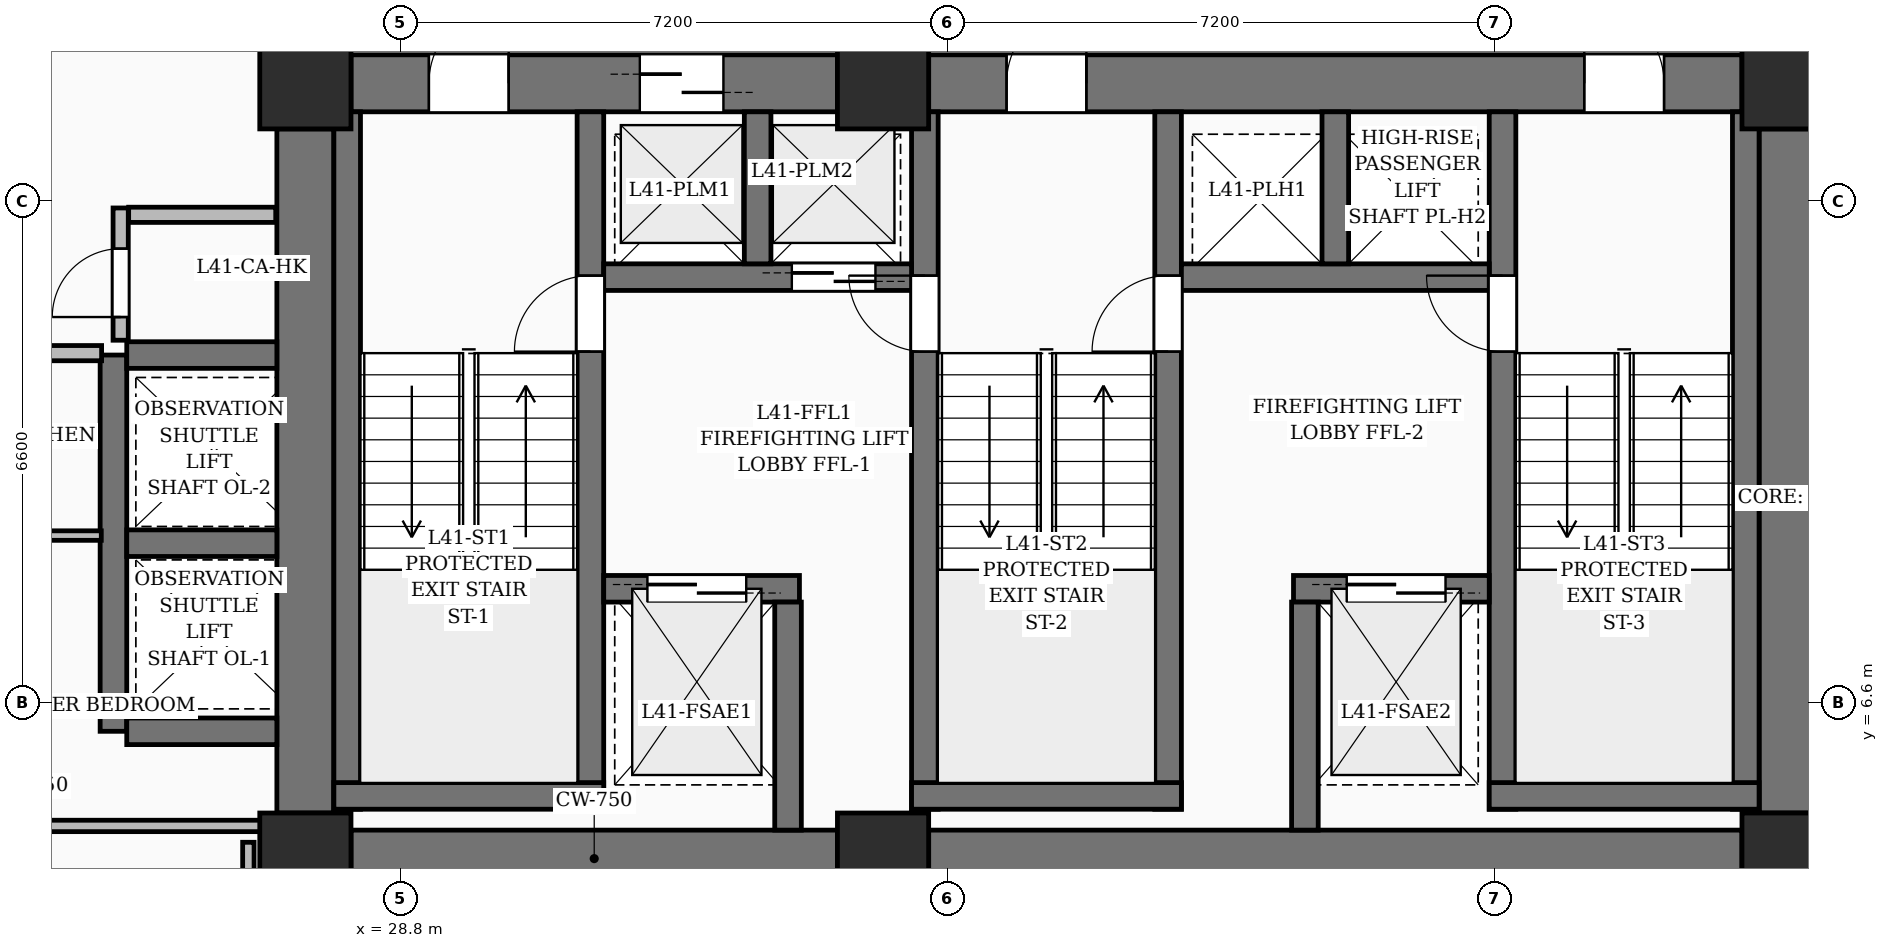
"""IFC4 building model, lengths in metres.
Left out: names, types, materials, properties, quantities, classifications, styles, units other than length and angle.
Written with IfcOpenShell. Run it as: python <this file> out.ifc"""

import sys

from ifc_helpers import new_model, si_unit, direction, frame, frame_2d, origin, origin_2d, place, context, subcontext, project, spatial, rectangle, extrude, element, fill, save


model = new_model("IFC4")
c1 = context("Model", 3, precision=1e-05, world=origin(), true_north=direction((0.0, 1.0)))
c2 = subcontext(c1, "Body", "Model", "MODEL_VIEW")
j1 = project(units=[si_unit("LENGTHUNIT", "METRE"), si_unit("PLANEANGLEUNIT", "RADIAN")], contexts=[c1])
p1 = place(None, origin())
s1 = spatial("IfcSite", under=j1, at=p1, CompositionType="ELEMENT")
p2 = place(p1, origin())
s2 = spatial("IfcBuilding", under=s1, at=p2, CompositionType="ELEMENT")
p3 = place(p2, frame((0.0, 0.0, 160.8)))
s3 = spatial("IfcBuildingStorey", under=s2, at=p3, CompositionType="ELEMENT", Elevation=160.8)
for number, where, z_axis, x_axis in (
    (1, (27.55, 4.55, 0.0), (0.0, 0.0, 1.0), (1.0, 0.0, 0.0)),
    (2, (35.15, 4.55, 0.0), (0.0, 0.0, 1.0), (1.0, 0.0, 0.0)),
    (3, (47.05, 4.55, 0.0), (0.0, 0.0, 1.0), (1.0, 0.0, 0.0)),
    (4, (27.55, 14.75, 0.0), (0.0, 0.0, 1.0), (1.0, 0.0, 0.0)),
    (5, (35.15, 14.75, 0.0), (0.0, 0.0, 1.0), (1.0, 0.0, 0.0)),
    (6, (47.05, 14.75, 0.0), (0.0, 0.0, 1.0), (1.0, 0.0, 0.0)),
):
    element("IfcColumn", number, at=place(p3, frame(where, z_axis=z_axis, x_axis=x_axis)), inside=s3, PredefinedType="COLUMN", context=c2, shape_type="SweptSolid", body=[
        extrude(rectangle(XDim=1.2, YDim=1.2, at=origin_2d()), origin(), (0.0, 0.0, 1.0), 3.6),
    ])
p4 = place(p3, frame((28.15, 4.55, 0.0), z_axis=(0.0, 0.0, 1.0), x_axis=(1.0, 0.0, 0.0)))
e7 = element("IfcWall", 7, at=p4, inside=s3, PredefinedType="SHEAR", context=c2, shape_type="SweptSolid", body=[
    extrude(rectangle(XDim=6.4, YDim=0.75, at=frame_2d((3.2, 0.0))), origin(), (0.0, 0.0, 1.0), 3.6),
])
p5 = place(p3, frame((35.75, 4.55, 0.0), z_axis=(0.0, 0.0, 1.0), x_axis=(1.0, 0.0, 0.0)))
e8 = element("IfcWall", 8, at=p5, inside=s3, PredefinedType="SHEAR", context=c2, shape_type="SweptSolid", body=[
    extrude(rectangle(XDim=10.7, YDim=0.75, at=frame_2d((5.35, 0.0))), origin(), (0.0, 0.0, 1.0), 3.6),
])
p6 = place(p3, frame((28.15, 14.75, 0.0), z_axis=(0.0, 0.0, 1.0), x_axis=(1.0, 0.0, 0.0)))
e9 = element("IfcWall", 9, at=p6, inside=s3, PredefinedType="SHEAR", context=c2, shape_type="SweptSolid", body=[
    extrude(rectangle(XDim=6.4, YDim=0.75, at=frame_2d((3.2, 0.0))), origin(), (0.0, 0.0, 1.0), 3.6),
])
p7 = place(p6, frame((1.025, 0.0, 0.0)))
e10 = element("IfcOpeningElement", 10, at=p7, cuts=e9, PredefinedType="OPENING", context=c2, shape_type="SweptSolid", body=[
    extrude(rectangle(XDim=1.05, YDim=2.15, at=frame_2d((0.525, 1.075))), frame((0.0, 0.385, 0.0), z_axis=(0.0, -1.0, 0.0), x_axis=(1.0, 0.0, 0.0)), (0.0, 0.0, 1.0), 0.77),
])
p8 = place(p6, frame((3.8, 0.0, 0.0)))
e11 = element("IfcOpeningElement", 11, at=p8, cuts=e9, PredefinedType="OPENING", context=c2, shape_type="SweptSolid", body=[
    extrude(rectangle(XDim=1.1, YDim=2.2, at=frame_2d((0.55, 1.1))), frame((0.0, 0.385, 0.0), z_axis=(0.0, -1.0, 0.0), x_axis=(1.0, 0.0, 0.0)), (0.0, 0.0, 1.0), 0.77),
])
p9 = place(p3, frame((35.75, 14.75, 0.0), z_axis=(0.0, 0.0, 1.0), x_axis=(1.0, 0.0, 0.0)))
e12 = element("IfcWall", 12, at=p9, inside=s3, PredefinedType="SHEAR", context=c2, shape_type="SweptSolid", body=[
    extrude(rectangle(XDim=10.7, YDim=0.75, at=frame_2d((5.35, 0.0))), origin(), (0.0, 0.0, 1.0), 3.6),
])
p10 = place(p9, frame((1.025, 0.0, 0.0)))
e13 = element("IfcOpeningElement", 13, at=p10, cuts=e12, PredefinedType="OPENING", context=c2, shape_type="SweptSolid", body=[
    extrude(rectangle(XDim=1.05, YDim=2.15, at=frame_2d((0.525, 1.075))), frame((0.0, 0.385, 0.0), z_axis=(0.0, -1.0, 0.0), x_axis=(1.0, 0.0, 0.0)), (0.0, 0.0, 1.0), 0.77),
])
p11 = place(p9, frame((8.625, 0.0, 0.0)))
e14 = element("IfcOpeningElement", 14, at=p11, cuts=e12, PredefinedType="OPENING", context=c2, shape_type="SweptSolid", body=[
    extrude(rectangle(XDim=1.05, YDim=2.15, at=frame_2d((0.525, 1.075))), frame((0.0, 0.385, 0.0), z_axis=(0.0, -1.0, 0.0), x_axis=(1.0, 0.0, 0.0)), (0.0, 0.0, 1.0), 0.77),
])
for number, where, z_axis, x_axis in (
    (15, (27.55, 5.15, 0.0), (0.0, 0.0, 1.0), (0.0, 1.0, 0.0)),
    (16, (47.05, 5.15, 0.0), (0.0, 0.0, 1.0), (0.0, 1.0, 0.0)),
):
    element("IfcWall", number, at=place(p3, frame(where, z_axis=z_axis, x_axis=x_axis)), inside=s3, PredefinedType="SHEAR", context=c2, shape_type="SweptSolid", body=[
        extrude(rectangle(XDim=9.0, YDim=0.75, at=frame_2d((4.5, 0.0))), origin(), (0.0, 0.0, 1.0), 3.6),
    ])
p12 = place(p3, frame((28.1, 5.2, 0.0), z_axis=(0.0, 0.0, 1.0), x_axis=(0.0, 1.0, 0.0)))
e17 = element("IfcWall", 17, at=p12, inside=s3, PredefinedType="SOLIDWALL", context=c2, shape_type="SweptSolid", body=[
    extrude(rectangle(XDim=9.175, YDim=0.35, at=frame_2d((4.587, 0.0))), origin(), (0.0, 0.0, 1.0), 3.6),
])
p13 = place(p3, frame((31.3, 5.2, 0.0), z_axis=(0.0, 0.0, 1.0), x_axis=(0.0, 1.0, 0.0)))
e18 = element("IfcWall", 18, at=p13, inside=s3, PredefinedType="SOLIDWALL", context=c2, shape_type="SweptSolid", body=[
    extrude(rectangle(XDim=9.175, YDim=0.35, at=frame_2d((4.587, 0.0))), origin(), (0.0, 0.0, 1.0), 3.6),
])
p14 = place(p13, frame((6.02, 0.0, 0.0)))
e19 = element("IfcOpeningElement", 19, at=p14, cuts=e18, PredefinedType="OPENING", context=c2, shape_type="SweptSolid", body=[
    extrude(rectangle(XDim=1.0, YDim=2.15, at=frame_2d((0.5, 1.075))), frame((0.0, 0.185, 0.0), z_axis=(0.0, -1.0, 0.0), x_axis=(1.0, 0.0, 0.0)), (0.0, 0.0, 1.0), 0.37),
])
p15 = place(p3, frame((27.925, 5.375, 0.0), z_axis=(0.0, 0.0, 1.0), x_axis=(1.0, 0.0, 0.0)))
e20 = element("IfcWall", 20, at=p15, inside=s3, PredefinedType="SOLIDWALL", context=c2, shape_type="SweptSolid", body=[
    extrude(rectangle(XDim=3.55, YDim=0.35, at=frame_2d((1.775, 0.0))), origin(), (0.0, 0.0, 1.0), 3.6),
])
p16 = place(p3, frame((35.7, 5.2, 0.0), z_axis=(0.0, 0.0, 1.0), x_axis=(0.0, 1.0, 0.0)))
e21 = element("IfcWall", 21, at=p16, inside=s3, PredefinedType="SOLIDWALL", context=c2, shape_type="SweptSolid", body=[
    extrude(rectangle(XDim=9.175, YDim=0.35, at=frame_2d((4.587, 0.0))), origin(), (0.0, 0.0, 1.0), 3.6),
])
p17 = place(p16, frame((6.02, 0.0, 0.0)))
e22 = element("IfcOpeningElement", 22, at=p17, cuts=e21, PredefinedType="OPENING", context=c2, shape_type="SweptSolid", body=[
    extrude(rectangle(XDim=1.0, YDim=2.15, at=frame_2d((0.5, 1.075))), frame((0.0, 0.185, 0.0), z_axis=(0.0, -1.0, 0.0), x_axis=(1.0, 0.0, 0.0)), (0.0, 0.0, 1.0), 0.37),
])
p18 = place(p3, frame((38.9, 5.2, 0.0), z_axis=(0.0, 0.0, 1.0), x_axis=(0.0, 1.0, 0.0)))
e23 = element("IfcWall", 23, at=p18, inside=s3, PredefinedType="SOLIDWALL", context=c2, shape_type="SweptSolid", body=[
    extrude(rectangle(XDim=9.175, YDim=0.35, at=frame_2d((4.587, 0.0))), origin(), (0.0, 0.0, 1.0), 3.6),
])
p19 = place(p18, frame((6.02, 0.0, 0.0)))
e24 = element("IfcOpeningElement", 24, at=p19, cuts=e23, PredefinedType="OPENING", context=c2, shape_type="SweptSolid", body=[
    extrude(rectangle(XDim=1.0, YDim=2.15, at=frame_2d((0.5, 1.075))), frame((0.0, 0.185, 0.0), z_axis=(0.0, -1.0, 0.0), x_axis=(1.0, 0.0, 0.0)), (0.0, 0.0, 1.0), 0.37),
])
p20 = place(p3, frame((35.525, 5.375, 0.0), z_axis=(0.0, 0.0, 1.0), x_axis=(1.0, 0.0, 0.0)))
e25 = element("IfcWall", 25, at=p20, inside=s3, PredefinedType="SOLIDWALL", context=c2, shape_type="SweptSolid", body=[
    extrude(rectangle(XDim=3.55, YDim=0.35, at=frame_2d((1.775, 0.0))), origin(), (0.0, 0.0, 1.0), 3.6),
])
p21 = place(p3, frame((43.3, 5.2, 0.0), z_axis=(0.0, 0.0, 1.0), x_axis=(0.0, 1.0, 0.0)))
e26 = element("IfcWall", 26, at=p21, inside=s3, PredefinedType="SOLIDWALL", context=c2, shape_type="SweptSolid", body=[
    extrude(rectangle(XDim=9.175, YDim=0.35, at=frame_2d((4.587, 0.0))), origin(), (0.0, 0.0, 1.0), 3.6),
])
p22 = place(p21, frame((6.02, 0.0, 0.0)))
e27 = element("IfcOpeningElement", 27, at=p22, cuts=e26, PredefinedType="OPENING", context=c2, shape_type="SweptSolid", body=[
    extrude(rectangle(XDim=1.0, YDim=2.15, at=frame_2d((0.5, 1.075))), frame((0.0, 0.185, 0.0), z_axis=(0.0, -1.0, 0.0), x_axis=(1.0, 0.0, 0.0)), (0.0, 0.0, 1.0), 0.37),
])
p23 = place(p3, frame((46.5, 5.2, 0.0), z_axis=(0.0, 0.0, 1.0), x_axis=(0.0, 1.0, 0.0)))
e28 = element("IfcWall", 28, at=p23, inside=s3, PredefinedType="SOLIDWALL", context=c2, shape_type="SweptSolid", body=[
    extrude(rectangle(XDim=9.175, YDim=0.35, at=frame_2d((4.587, 0.0))), origin(), (0.0, 0.0, 1.0), 3.6),
])
p24 = place(p3, frame((43.125, 5.375, 0.0), z_axis=(0.0, 0.0, 1.0), x_axis=(1.0, 0.0, 0.0)))
e29 = element("IfcWall", 29, at=p24, inside=s3, PredefinedType="SOLIDWALL", context=c2, shape_type="SweptSolid", body=[
    extrude(rectangle(XDim=3.55, YDim=0.35, at=frame_2d((1.775, 0.0))), origin(), (0.0, 0.0, 1.0), 3.6),
])
p25 = place(p3, frame((31.475, 8.1, 0.0), z_axis=(0.0, 0.0, 1.0), x_axis=(1.0, 0.0, 0.0)))
e30 = element("IfcWall", 30, at=p25, inside=s3, PredefinedType="SOLIDWALL", context=c2, shape_type="SweptSolid", body=[
    extrude(rectangle(XDim=2.575, YDim=0.35, at=frame_2d((1.288, 0.0))), origin(), (0.0, 0.0, 1.0), 3.6),
])
p26 = place(p25, frame((0.575, 0.0, 0.0)))
e31 = element("IfcOpeningElement", 31, at=p26, cuts=e30, PredefinedType="OPENING", context=c2, shape_type="SweptSolid", body=[
    extrude(rectangle(XDim=1.3, YDim=2.25, at=frame_2d((0.65, 1.125))), frame((0.0, 0.185, 0.0), z_axis=(0.0, -1.0, 0.0), x_axis=(1.0, 0.0, 0.0)), (0.0, 0.0, 1.0), 0.37),
])
p27 = place(p3, frame((40.55, 8.1, 0.0), z_axis=(0.0, 0.0, 1.0), x_axis=(1.0, 0.0, 0.0)))
e32 = element("IfcWall", 32, at=p27, inside=s3, PredefinedType="SOLIDWALL", context=c2, shape_type="SweptSolid", body=[
    extrude(rectangle(XDim=2.575, YDim=0.35, at=frame_2d((1.288, 0.0))), origin(), (0.0, 0.0, 1.0), 3.6),
])
p28 = place(p27, frame((0.7, 0.0, 0.0)))
e33 = element("IfcOpeningElement", 33, at=p28, cuts=e32, PredefinedType="OPENING", context=c2, shape_type="SweptSolid", body=[
    extrude(rectangle(XDim=1.3, YDim=2.25, at=frame_2d((0.65, 1.125))), frame((0.0, 0.185, 0.0), z_axis=(0.0, -1.0, 0.0), x_axis=(1.0, 0.0, 0.0)), (0.0, 0.0, 1.0), 0.37),
])
for number, where, z_axis, x_axis in (
    (34, (33.9, 4.925, 0.0), (0.0, 0.0, 1.0), (0.0, 1.0, 0.0)),
    (35, (40.7, 4.925, 0.0), (0.0, 0.0, 1.0), (0.0, 1.0, 0.0)),
):
    element("IfcWall", number, at=place(p3, frame(where, z_axis=z_axis, x_axis=x_axis)), inside=s3, PredefinedType="SOLIDWALL", context=c2, shape_type="SweptSolid", body=[
        extrude(rectangle(XDim=3.0, YDim=0.35, at=frame_2d((1.5, 0.0))), origin(), (0.0, 0.0, 1.0), 3.6),
    ])
p29 = place(p3, frame((31.475, 12.2, 0.0), z_axis=(0.0, 0.0, 1.0), x_axis=(1.0, 0.0, 0.0)))
e36 = element("IfcWall", 36, at=p29, inside=s3, PredefinedType="SOLIDWALL", context=c2, shape_type="SweptSolid", body=[
    extrude(rectangle(XDim=4.05, YDim=0.35, at=frame_2d((2.025, 0.0))), origin(), (0.0, 0.0, 1.0), 3.6),
])
p30 = place(p29, frame((2.475, 0.0, 0.0)))
e37 = element("IfcOpeningElement", 37, at=p30, cuts=e36, PredefinedType="OPENING", context=c2, shape_type="SweptSolid", body=[
    extrude(rectangle(XDim=1.1, YDim=2.2, at=frame_2d((0.55, 1.1))), frame((0.0, 0.185, 0.0), z_axis=(0.0, -1.0, 0.0), x_axis=(1.0, 0.0, 0.0)), (0.0, 0.0, 1.0), 0.37),
])
p31 = place(p3, frame((33.5, 12.375, 0.0), z_axis=(0.0, 0.0, 1.0), x_axis=(0.0, 1.0, 0.0)))
e38 = element("IfcWall", 38, at=p31, inside=s3, PredefinedType="SOLIDWALL", context=c2, shape_type="SweptSolid", body=[
    extrude(rectangle(XDim=2.0, YDim=0.35, at=frame_2d((1.0, 0.0))), origin(), (0.0, 0.0, 1.0), 3.6),
])
p32 = place(p3, frame((39.075, 12.2, 0.0), z_axis=(0.0, 0.0, 1.0), x_axis=(1.0, 0.0, 0.0)))
e39 = element("IfcWall", 39, at=p32, inside=s3, PredefinedType="SOLIDWALL", context=c2, shape_type="SweptSolid", body=[
    extrude(rectangle(XDim=4.05, YDim=0.35, at=frame_2d((2.025, 0.0))), origin(), (0.0, 0.0, 1.0), 3.6),
])
p33 = place(p3, frame((41.1, 12.375, 0.0), z_axis=(0.0, 0.0, 1.0), x_axis=(0.0, 1.0, 0.0)))
e40 = element("IfcWall", 40, at=p33, inside=s3, PredefinedType="SOLIDWALL", context=c2, shape_type="SweptSolid", body=[
    extrude(rectangle(XDim=2.0, YDim=0.35, at=frame_2d((1.0, 0.0))), origin(), (0.0, 0.0, 1.0), 3.6),
])
p34 = place(p3, frame((25.025, 6.225, 0.0), z_axis=(0.0, 0.0, 1.0), x_axis=(0.0, 1.0, 0.0)))
e41 = element("IfcWall", 41, at=p34, inside=s3, PredefinedType="SOLIDWALL", context=c2, shape_type="SweptSolid", body=[
    extrude(rectangle(XDim=4.95, YDim=0.35, at=frame_2d((2.475, 0.0))), origin(), (0.0, 0.0, 1.0), 3.6),
])
for number, where, z_axis, x_axis in (
    (42, (25.2, 6.225, 0.0), (0.0, 0.0, 1.0), (1.0, 0.0, 0.0)),
    (43, (25.2, 8.7, 0.0), (0.0, 0.0, 1.0), (1.0, 0.0, 0.0)),
    (44, (25.2, 11.175, 0.0), (0.0, 0.0, 1.0), (1.0, 0.0, 0.0)),
):
    element("IfcWall", number, at=place(p3, frame(where, z_axis=z_axis, x_axis=x_axis)), inside=s3, PredefinedType="SOLIDWALL", context=c2, shape_type="SweptSolid", body=[
        extrude(rectangle(XDim=1.975, YDim=0.35, at=frame_2d((0.988, 0.0))), origin(), (0.0, 0.0, 1.0), 3.6),
    ])
p35 = place(p3, frame((25.12, 11.37, 0.0), z_axis=(0.0, 0.0, 1.0), x_axis=(0.0, 1.0, 0.0)))
e45 = element("IfcWall", 45, at=p35, inside=s3, PredefinedType="PARTITIONING", context=c2, shape_type="SweptSolid", body=[
    extrude(rectangle(XDim=1.74, YDim=0.2, at=frame_2d((0.87, 0.0))), origin(), (0.0, 0.0, 1.0), 3.35),
])
p36 = place(p35, frame((0.305, 0.0, 0.0)))
e46 = element("IfcOpeningElement", 46, at=p36, cuts=e45, PredefinedType="OPENING", context=c2, shape_type="SweptSolid", body=[
    extrude(rectangle(XDim=0.9, YDim=2.1, at=frame_2d((0.45, 1.05))), frame((0.0, 0.11, 0.0), z_axis=(0.0, -1.0, 0.0), x_axis=(1.0, 0.0, 0.0)), (0.0, 0.0, 1.0), 0.22),
])
p37 = place(p3, frame((25.225, 13.02, 0.0), z_axis=(0.0, 0.0, 1.0), x_axis=(1.0, 0.0, 0.0)))
e47 = element("IfcWall", 47, at=p37, inside=s3, PredefinedType="PARTITIONING", context=c2, shape_type="SweptSolid", body=[
    extrude(rectangle(XDim=1.935, YDim=0.2, at=frame_2d((0.967, 0.0))), origin(), (0.0, 0.0, 1.0), 3.35),
])
p38 = place(p3, frame((21.485, 11.2, 0.0), z_axis=(0.0, 0.0, 1.0), x_axis=(1.0, 0.0, 0.0)))
e48 = element("IfcWall", 48, at=p38, inside=s3, PredefinedType="PARTITIONING", context=c2, shape_type="SweptSolid", body=[
    extrude(rectangle(XDim=3.384, YDim=0.2, at=frame_2d((1.692, 0.0))), origin(), (0.0, 0.0, 1.0), 3.35),
])
p39 = place(p3, frame((27.175, 4.98, 0.0), z_axis=(0.0, 0.0, 1.0), x_axis=(-1.0, 0.0, 0.0)))
e49 = element("IfcWall", 49, at=p39, inside=s3, PredefinedType="PARTITIONING", context=c2, shape_type="SweptSolid", body=[
    extrude(rectangle(XDim=6.365, YDim=0.15, at=frame_2d((3.183, 0.0))), origin(), (0.0, 0.0, 1.0), 2.57),
])
p40 = place(p3, frame((26.816, 1.899, 0.0), z_axis=(0.0, 0.0, 1.0), x_axis=(0.115732894013, 0.993280371921, 0.0)))
e50 = element("IfcWall", 50, at=p40, inside=s3, PredefinedType="PARTITIONING", context=c2, shape_type="SweptSolid", body=[
    extrude(rectangle(XDim=3.042, YDim=0.2, at=frame_2d((1.521, 0.0))), origin(), (0.0, 0.0, 1.0), 2.57),
])
p41 = place(p3, frame((20.798, 8.8, 0.0), z_axis=(0.0, 0.0, 1.0), x_axis=(1.0, 0.0, 0.0)))
e51 = element("IfcWall", 51, at=p41, inside=s3, PredefinedType="PARTITIONING", context=c2, shape_type="SweptSolid", body=[
    extrude(rectangle(XDim=4.067, YDim=0.125, at=frame_2d((2.034, 0.0))), origin(), (0.0, 0.0, 1.0), 2.393),
])
p42 = place(p3, frame((26.8, 3.849, 0.0), z_axis=(0.0, 0.0, 1.0), x_axis=(0.0, 1.0, 0.0)))
e52 = element("IfcWall", 52, at=p42, inside=s3, PredefinedType="PARTITIONING", context=c2, shape_type="SweptSolid", body=[
    extrude(rectangle(XDim=0.916, YDim=0.15, at=frame_2d((0.458, 0.0))), origin(), (0.0, 0.0, 1.0), 2.436),
])
p43 = place(p7, origin())
e53 = element("IfcDoor", 53, at=p43, inside=s3, OperationType="SINGLE_SWING_RIGHT", PredefinedType="DOOR", context=c2, shape_type="SweptSolid", body=[
    extrude(rectangle(XDim=1.05, YDim=2.15, at=frame_2d((0.525, 1.075))), frame((0.0, 0.025, 0.0), z_axis=(0.0, -1.0, 0.0), x_axis=(1.0, 0.0, 0.0)), (0.0, 0.0, 1.0), 0.05),
])
fill(e10, e53)
p44 = place(p10, origin())
e54 = element("IfcDoor", 54, at=p44, inside=s3, OperationType="SINGLE_SWING_RIGHT", PredefinedType="DOOR", context=c2, shape_type="SweptSolid", body=[
    extrude(rectangle(XDim=1.05, YDim=2.15, at=frame_2d((0.525, 1.075))), frame((0.0, 0.025, 0.0), z_axis=(0.0, -1.0, 0.0), x_axis=(1.0, 0.0, 0.0)), (0.0, 0.0, 1.0), 0.05),
])
fill(e13, e54)
p45 = place(p11, origin())
e55 = element("IfcDoor", 55, at=p45, inside=s3, OperationType="SINGLE_SWING_LEFT", PredefinedType="DOOR", context=c2, shape_type="SweptSolid", body=[
    extrude(rectangle(XDim=1.05, YDim=2.15, at=frame_2d((0.525, 1.075))), frame((0.0, 0.025, 0.0), z_axis=(0.0, -1.0, 0.0), x_axis=(1.0, 0.0, 0.0)), (0.0, 0.0, 1.0), 0.05),
])
fill(e14, e55)
p46 = place(p14, origin())
e56 = element("IfcDoor", 56, at=p46, inside=s3, OperationType="SINGLE_SWING_LEFT", PredefinedType="DOOR", context=c2, shape_type="SweptSolid", body=[
    extrude(rectangle(XDim=1.0, YDim=2.15, at=frame_2d((0.5, 1.075))), frame((0.0, 0.025, 0.0), z_axis=(0.0, -1.0, 0.0), x_axis=(1.0, 0.0, 0.0)), (0.0, 0.0, 1.0), 0.05),
])
fill(e19, e56)
p47 = place(p17, origin())
e57 = element("IfcDoor", 57, at=p47, inside=s3, OperationType="SINGLE_SWING_RIGHT", PredefinedType="DOOR", context=c2, shape_type="SweptSolid", body=[
    extrude(rectangle(XDim=1.0, YDim=2.15, at=frame_2d((0.5, 1.075))), frame((0.0, 0.025, 0.0), z_axis=(0.0, -1.0, 0.0), x_axis=(1.0, 0.0, 0.0)), (0.0, 0.0, 1.0), 0.05),
])
fill(e22, e57)
p48 = place(p19, origin())
e58 = element("IfcDoor", 58, at=p48, inside=s3, OperationType="SINGLE_SWING_LEFT", PredefinedType="DOOR", context=c2, shape_type="SweptSolid", body=[
    extrude(rectangle(XDim=1.0, YDim=2.15, at=frame_2d((0.5, 1.075))), frame((0.0, 0.025, 0.0), z_axis=(0.0, -1.0, 0.0), x_axis=(1.0, 0.0, 0.0)), (0.0, 0.0, 1.0), 0.05),
])
fill(e24, e58)
p49 = place(p22, origin())
e59 = element("IfcDoor", 59, at=p49, inside=s3, OperationType="SINGLE_SWING_RIGHT", PredefinedType="DOOR", context=c2, shape_type="SweptSolid", body=[
    extrude(rectangle(XDim=1.0, YDim=2.15, at=frame_2d((0.5, 1.075))), frame((0.0, 0.025, 0.0), z_axis=(0.0, -1.0, 0.0), x_axis=(1.0, 0.0, 0.0)), (0.0, 0.0, 1.0), 0.05),
])
fill(e27, e59)
p50 = place(p26, origin())
e60 = element("IfcDoor", 60, at=p50, inside=s3, OperationType="DOUBLE_DOOR_SLIDING", PredefinedType="DOOR", context=c2, shape_type="SweptSolid", body=[
    extrude(rectangle(XDim=1.3, YDim=2.25, at=frame_2d((0.65, 1.125))), frame((0.0, 0.025, 0.0), z_axis=(0.0, -1.0, 0.0), x_axis=(1.0, 0.0, 0.0)), (0.0, 0.0, 1.0), 0.05),
])
fill(e31, e60)
p51 = place(p28, origin())
e61 = element("IfcDoor", 61, at=p51, inside=s3, OperationType="DOUBLE_DOOR_SLIDING", PredefinedType="DOOR", context=c2, shape_type="SweptSolid", body=[
    extrude(rectangle(XDim=1.3, YDim=2.25, at=frame_2d((0.65, 1.125))), frame((0.0, 0.025, 0.0), z_axis=(0.0, -1.0, 0.0), x_axis=(1.0, 0.0, 0.0)), (0.0, 0.0, 1.0), 0.05),
])
fill(e33, e61)
p52 = place(p8, origin())
e62 = element("IfcDoor", 62, at=p52, inside=s3, OperationType="DOUBLE_DOOR_SLIDING", PredefinedType="DOOR", context=c2, shape_type="SweptSolid", body=[
    extrude(rectangle(XDim=1.1, YDim=2.2, at=frame_2d((0.55, 1.1))), frame((0.0, 0.025, 0.0), z_axis=(0.0, -1.0, 0.0), x_axis=(1.0, 0.0, 0.0)), (0.0, 0.0, 1.0), 0.05),
])
fill(e11, e62)
p53 = place(p30, origin())
e63 = element("IfcDoor", 63, at=p53, inside=s3, OperationType="DOUBLE_DOOR_SLIDING", PredefinedType="DOOR", context=c2, shape_type="SweptSolid", body=[
    extrude(rectangle(XDim=1.1, YDim=2.2, at=frame_2d((0.55, 1.1))), frame((0.0, 0.025, 0.0), z_axis=(0.0, -1.0, 0.0), x_axis=(1.0, 0.0, 0.0)), (0.0, 0.0, 1.0), 0.05),
])
fill(e37, e63)
p54 = place(p36, origin())
e64 = element("IfcDoor", 64, at=p54, inside=s3, OperationType="SINGLE_SWING_LEFT", PredefinedType="DOOR", context=c2, shape_type="SweptSolid", body=[
    extrude(rectangle(XDim=0.9, YDim=2.1, at=frame_2d((0.45, 1.05))), frame((0.0, 0.025, 0.0), z_axis=(0.0, -1.0, 0.0), x_axis=(1.0, 0.0, 0.0)), (0.0, 0.0, 1.0), 0.05),
])
fill(e46, e64)
save(model, sys.argv[1])
